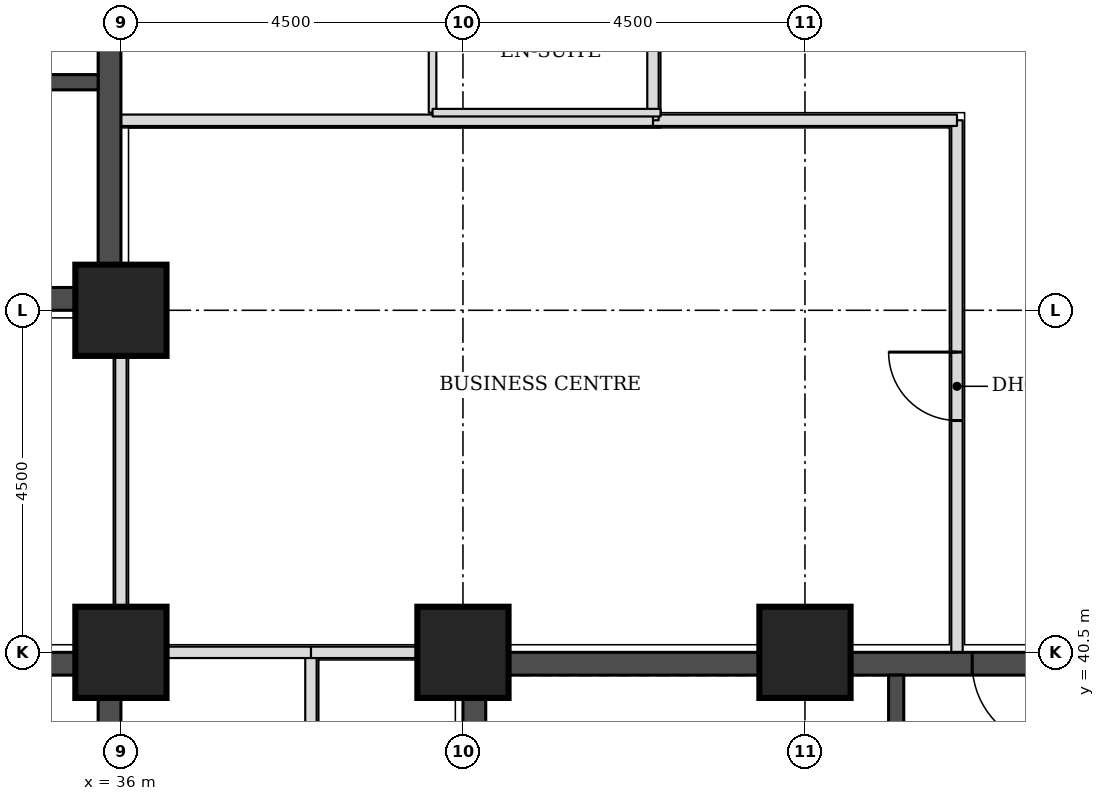
"""IFC4 building model, lengths in metres.
Left out: names, types, materials, properties, quantities, classifications, styles, units other than length and angle.
Written with IfcOpenShell. Run it as: python <this file> out.ifc"""

import sys

from ifc_helpers import new_model, si_unit, direction, frame, frame_2d, origin, origin_2d, place, context, subcontext, project, spatial, rectangle, extrude, element, fill, save


model = new_model("IFC4")
c1 = context("Model", 3, precision=1e-05, world=origin(), true_north=direction((0.0, 1.0)))
c2 = subcontext(c1, "Body", "Model", "MODEL_VIEW")
j1 = project(units=[si_unit("LENGTHUNIT", "METRE"), si_unit("PLANEANGLEUNIT", "RADIAN")], contexts=[c1])
p1 = place(None, origin())
s1 = spatial("IfcSite", under=j1, at=p1, CompositionType="ELEMENT")
p2 = place(p1, origin())
s2 = spatial("IfcBuilding", under=s1, at=p2, CompositionType="ELEMENT")
p3 = place(p2, frame((0.0, 0.0, 52.8)))
s3 = spatial("IfcBuildingStorey", under=s2, at=p3, CompositionType="ELEMENT", Elevation=52.8)
for number, where, z_axis, x_axis in (
    (1, (36.0, 40.5, 0.0), (0.0, 0.0, 1.0), (1.0, 0.0, 0.0)),
    (2, (40.5, 40.5, 0.0), (0.0, 0.0, 1.0), (1.0, 0.0, 0.0)),
    (3, (45.0, 40.5, 0.0), (0.0, 0.0, 1.0), (1.0, 0.0, 0.0)),
    (4, (36.0, 45.0, 0.0), (0.0, 0.0, 1.0), (1.0, 0.0, 0.0)),
):
    element("IfcColumn", number, at=place(p3, frame(where, z_axis=z_axis, x_axis=x_axis)), inside=s3, PredefinedType="COLUMN", context=c2, shape_type="SweptSolid", body=[
        extrude(rectangle(XDim=1.2, YDim=1.2, at=origin_2d()), origin(), (0.0, 0.0, 1.0), 3.3),
    ])
p4 = place(p3, frame((27.3, 45.15, 0.0), z_axis=(0.0, 0.0, 1.0), x_axis=(1.0, 0.0, 0.0)))
e5 = element("IfcWall", 5, at=p4, inside=s3, PredefinedType="SHEAR", context=c2, shape_type="SweptSolid", body=[
    extrude(rectangle(XDim=8.4, YDim=0.3, at=frame_2d((4.2, 0.0))), origin(), (0.0, 0.0, 1.0), 3.3),
])
p5 = place(p4, frame((5.2, 0.0, 0.0)))
e6 = element("IfcOpeningElement", 6, at=p5, cuts=e5, PredefinedType="OPENING", context=c2, shape_type="SweptSolid", body=[
    extrude(rectangle(XDim=1.0, YDim=2.1, at=frame_2d((0.5, 1.05))), frame((0.0, 0.16, 0.0), z_axis=(0.0, -1.0, 0.0), x_axis=(1.0, 0.0, 0.0)), (0.0, 0.0, 1.0), 0.32),
])
p6 = place(p3, frame((35.85, 45.0, 0.0), z_axis=(0.0, 0.0, 1.0), x_axis=(0.0, 1.0, 0.0)))
e7 = element("IfcWall", 7, at=p6, inside=s3, PredefinedType="SHEAR", context=c2, shape_type="SweptSolid", body=[
    extrude(rectangle(XDim=9.0, YDim=0.3, at=frame_2d((4.5, 0.0))), origin(), (0.0, 0.0, 1.0), 3.3),
])
p7 = place(p3, frame((40.8, 40.35, 0.0), z_axis=(0.0, 0.0, 1.0), x_axis=(1.0, 0.0, 0.0)))
e8 = element("IfcWall", 8, at=p7, inside=s3, PredefinedType="SHEAR", context=c2, shape_type="SweptSolid", body=[
    extrude(rectangle(XDim=8.4, YDim=0.3, at=frame_2d((4.2, 0.0))), origin(), (0.0, 0.0, 1.0), 3.3),
])
p8 = place(p7, frame((6.4, 0.0, 0.0)))
e9 = element("IfcOpeningElement", 9, at=p8, cuts=e8, PredefinedType="OPENING", context=c2, shape_type="SweptSolid", body=[
    extrude(rectangle(XDim=1.1, YDim=2.1, at=frame_2d((0.55, 1.05))), frame((0.0, 0.16, 0.0), z_axis=(0.0, -1.0, 0.0), x_axis=(1.0, 0.0, 0.0)), (0.0, 0.0, 1.0), 0.32),
])
p9 = place(p3, frame((40.65, 31.5, 0.0), z_axis=(0.0, 0.0, 1.0), x_axis=(0.0, 1.0, 0.0)))
e10 = element("IfcWall", 10, at=p9, inside=s3, PredefinedType="SHEAR", context=c2, shape_type="SweptSolid", body=[
    extrude(rectangle(XDim=9.0, YDim=0.3, at=frame_2d((4.5, 0.0))), origin(), (0.0, 0.0, 1.0), 3.3),
])
p10 = place(p9, frame((0.4, 0.0, 0.0)))
e11 = element("IfcOpeningElement", 11, at=p10, cuts=e10, PredefinedType="OPENING", context=c2, shape_type="SweptSolid", body=[
    extrude(rectangle(XDim=1.1, YDim=2.1, at=frame_2d((0.55, 1.05))), frame((0.0, 0.16, 0.0), z_axis=(0.0, -1.0, 0.0), x_axis=(1.0, 0.0, 0.0)), (0.0, 0.0, 1.0), 0.32),
])
p11 = place(p3, frame((27.3, 40.35, 0.0), z_axis=(0.0, 0.0, 1.0), x_axis=(1.0, 0.0, 0.0)))
e12 = element("IfcWall", 12, at=p11, inside=s3, PredefinedType="SHEAR", context=c2, shape_type="SweptSolid", body=[
    extrude(rectangle(XDim=8.4, YDim=0.3, at=frame_2d((4.2, 0.0))), origin(), (0.0, 0.0, 1.0), 3.3),
])
p12 = place(p11, frame((6.4, 0.0, 0.0)))
e13 = element("IfcOpeningElement", 13, at=p12, cuts=e12, PredefinedType="OPENING", context=c2, shape_type="SweptSolid", body=[
    extrude(rectangle(XDim=1.1, YDim=2.1, at=frame_2d((0.55, 1.05))), frame((0.0, 0.16, 0.0), z_axis=(0.0, -1.0, 0.0), x_axis=(1.0, 0.0, 0.0)), (0.0, 0.0, 1.0), 0.32),
])
p13 = place(p3, frame((35.85, 31.5, 0.0), z_axis=(0.0, 0.0, 1.0), x_axis=(0.0, 1.0, 0.0)))
e14 = element("IfcWall", 14, at=p13, inside=s3, PredefinedType="SHEAR", context=c2, shape_type="SweptSolid", body=[
    extrude(rectangle(XDim=9.0, YDim=0.3, at=frame_2d((4.5, 0.0))), origin(), (0.0, 0.0, 1.0), 3.3),
])
p14 = place(p3, frame((38.5, 25.65, 0.0), z_axis=(0.0, 0.0, 1.0), x_axis=(0.0, 1.0, 0.0)))
e15 = element("IfcWall", 15, at=p14, inside=s3, PredefinedType="PARTITIONING", context=c2, shape_type="SweptSolid", body=[
    extrude(rectangle(XDim=14.85, YDim=0.15, at=frame_2d((7.425, 0.0))), origin(), (0.0, 0.0, 1.0), 3.08),
])
p15 = place(p14, frame((7.54, 0.0, 0.0)))
e16 = element("IfcOpeningElement", 16, at=p15, cuts=e15, PredefinedType="OPENING", context=c2, shape_type="SweptSolid", body=[
    extrude(rectangle(XDim=0.9, YDim=2.1, at=frame_2d((0.45, 1.05))), frame((0.0, 0.085, 0.0), z_axis=(0.0, -1.0, 0.0), x_axis=(1.0, 0.0, 0.0)), (0.0, 0.0, 1.0), 0.17),
])
p16 = place(p3, frame((38.5, 40.5, 0.0), z_axis=(0.0, 0.0, 1.0), x_axis=(1.0, 0.0, 0.0)))
e17 = element("IfcWall", 17, at=p16, inside=s3, PredefinedType="PARTITIONING", context=c2, shape_type="SweptSolid", body=[
    extrude(rectangle(XDim=1.95, YDim=0.15, at=frame_2d((0.975, 0.0))), origin(), (0.0, 0.0, 1.0), 2.33),
])
p17 = place(p3, frame((36.0, 40.55, 0.0), z_axis=(0.0, 0.0, 1.0), x_axis=(0.0, 1.0, 0.0)))
e18 = element("IfcWall", 18, at=p17, inside=s3, PredefinedType="PARTITIONING", context=c2, shape_type="SweptSolid", body=[
    extrude(rectangle(XDim=4.4, YDim=0.15, at=frame_2d((2.2, 0.0))), origin(), (0.0, 0.0, 1.0), 2.33),
])
p18 = place(p3, frame((47.0, 40.5, 0.0), z_axis=(0.0, 0.0, 1.0), x_axis=(0.0, 1.0, 0.0)))
e19 = element("IfcWall", 19, at=p18, inside=s3, PredefinedType="PARTITIONING", context=c2, shape_type="SweptSolid", body=[
    extrude(rectangle(XDim=7.0, YDim=0.15, at=frame_2d((3.5, 0.0))), origin(), (0.0, 0.0, 1.0), 3.08),
])
p19 = place(p18, frame((3.05, 0.0, 0.0)))
e20 = element("IfcOpeningElement", 20, at=p19, cuts=e19, PredefinedType="OPENING", context=c2, shape_type="SweptSolid", body=[
    extrude(rectangle(XDim=0.9, YDim=2.1, at=frame_2d((0.45, 1.05))), frame((0.0, 0.085, 0.0), z_axis=(0.0, -1.0, 0.0), x_axis=(1.0, 0.0, 0.0)), (0.0, 0.0, 1.0), 0.17),
])
p20 = place(p3, frame((43.0, 47.5, 0.0), z_axis=(0.0, 0.0, 1.0), x_axis=(1.0, 0.0, 0.0)))
e21 = element("IfcWall", 21, at=p20, inside=s3, PredefinedType="PARTITIONING", context=c2, shape_type="SweptSolid", body=[
    extrude(rectangle(XDim=4.0, YDim=0.15, at=frame_2d((2.0, 0.0))), origin(), (0.0, 0.0, 1.0), 3.08),
])
p21 = place(p3, frame((43.0, 47.5, 0.0), z_axis=(0.0, 0.0, 1.0), x_axis=(0.0, 1.0, 0.0)))
e22 = element("IfcWall", 22, at=p21, inside=s3, PredefinedType="PARTITIONING", context=c2, shape_type="SweptSolid", body=[
    extrude(rectangle(XDim=6.5, YDim=0.15, at=frame_2d((3.25, 0.0))), origin(), (0.0, 0.0, 1.0), 3.08),
])
p22 = place(p21, frame((4.05, 0.0, 0.0)))
e23 = element("IfcOpeningElement", 23, at=p22, cuts=e22, PredefinedType="OPENING", context=c2, shape_type="SweptSolid", body=[
    extrude(rectangle(XDim=1.0, YDim=2.1, at=frame_2d((0.5, 1.05))), frame((0.0, 0.085, 0.0), z_axis=(0.0, -1.0, 0.0), x_axis=(1.0, 0.0, 0.0)), (0.0, 0.0, 1.0), 0.17),
])
p23 = place(p3, frame((36.05, 40.5, 0.0), z_axis=(0.0, 0.0, 1.0), x_axis=(1.0, 0.0, 0.0)))
e24 = element("IfcWall", 24, at=p23, inside=s3, PredefinedType="PARTITIONING", context=c2, shape_type="SweptSolid", body=[
    extrude(rectangle(XDim=2.45, YDim=0.15, at=frame_2d((1.225, 0.0))), origin(), (0.0, 0.0, 1.0), 2.33),
])
p24 = place(p3, frame((36.0, 47.5, 0.0), z_axis=(0.0, 0.0, 1.0), x_axis=(1.0, 0.0, 0.0)))
e25 = element("IfcWall", 25, at=p24, inside=s3, PredefinedType="PARTITIONING", context=c2, shape_type="SweptSolid", body=[
    extrude(rectangle(XDim=7.0, YDim=0.15, at=frame_2d((3.5, 0.0))), origin(), (0.0, 0.0, 1.0), 3.08),
])
p25 = place(p3, frame((40.1, 50.0, 0.0), z_axis=(0.0, 0.0, 1.0), x_axis=(0.0, -1.0, 0.0)))
e26 = element("IfcWall", 26, at=p25, inside=s3, PredefinedType="PARTITIONING", context=c2, shape_type="SweptSolid", body=[
    extrude(rectangle(XDim=2.4, YDim=0.1, at=frame_2d((1.2, 0.0))), origin(), (0.0, 0.0, 1.0), 3.08),
])
p26 = place(p3, frame((40.1, 47.6, 0.0), z_axis=(0.0, 0.0, 1.0), x_axis=(1.0, 0.0, 0.0)))
e27 = element("IfcWall", 27, at=p26, inside=s3, PredefinedType="PARTITIONING", context=c2, shape_type="SweptSolid", body=[
    extrude(rectangle(XDim=3.0, YDim=0.1, at=frame_2d((1.5, 0.0))), origin(), (0.0, 0.0, 1.0), 3.08),
])
p27 = place(p3, frame((32.7, 48.0, 0.0), z_axis=(0.0, 0.0, 1.0), x_axis=(1.0, 0.0, 0.0)))
e28 = element("IfcWall", 28, at=p27, inside=s3, PredefinedType="SOLIDWALL", context=c2, shape_type="SweptSolid", body=[
    extrude(rectangle(XDim=3.0, YDim=0.2, at=frame_2d((1.5, 0.0))), origin(), (0.0, 0.0, 1.0), 3.08),
])
p28 = place(p3, frame((46.2, 34.5, 0.0), z_axis=(0.0, 0.0, 1.0), x_axis=(0.0, 1.0, 0.0)))
e29 = element("IfcWall", 29, at=p28, inside=s3, PredefinedType="SOLIDWALL", context=c2, shape_type="SweptSolid", body=[
    extrude(rectangle(XDim=5.7, YDim=0.2, at=frame_2d((2.85, 0.0))), origin(), (0.0, 0.0, 1.0), 3.08),
])
p29 = place(p19, origin())
e30 = element("IfcDoor", 30, at=p29, inside=s3, OperationType="SINGLE_SWING_RIGHT", PredefinedType="DOOR", context=c2, shape_type="SweptSolid", body=[
    extrude(rectangle(XDim=0.9, YDim=2.1, at=frame_2d((0.45, 1.05))), frame((0.0, 0.025, 0.0), z_axis=(0.0, -1.0, 0.0), x_axis=(1.0, 0.0, 0.0)), (0.0, 0.0, 1.0), 0.05),
])
fill(e20, e30)
p30 = place(p8, frame((1.1, 0.0, 0.0), z_axis=(0.0, 0.0, 1.0), x_axis=(-1.0, 0.0, 0.0)))
e31 = element("IfcDoor", 31, at=p30, inside=s3, OperationType="SINGLE_SWING_LEFT", PredefinedType="DOOR", context=c2, shape_type="SweptSolid", body=[
    extrude(rectangle(XDim=1.1, YDim=2.1, at=frame_2d((0.55, 1.05))), frame((0.0, 0.025, 0.0), z_axis=(0.0, -1.0, 0.0), x_axis=(1.0, 0.0, 0.0)), (0.0, 0.0, 1.0), 0.05),
])
fill(e9, e31)
save(model, sys.argv[1])
